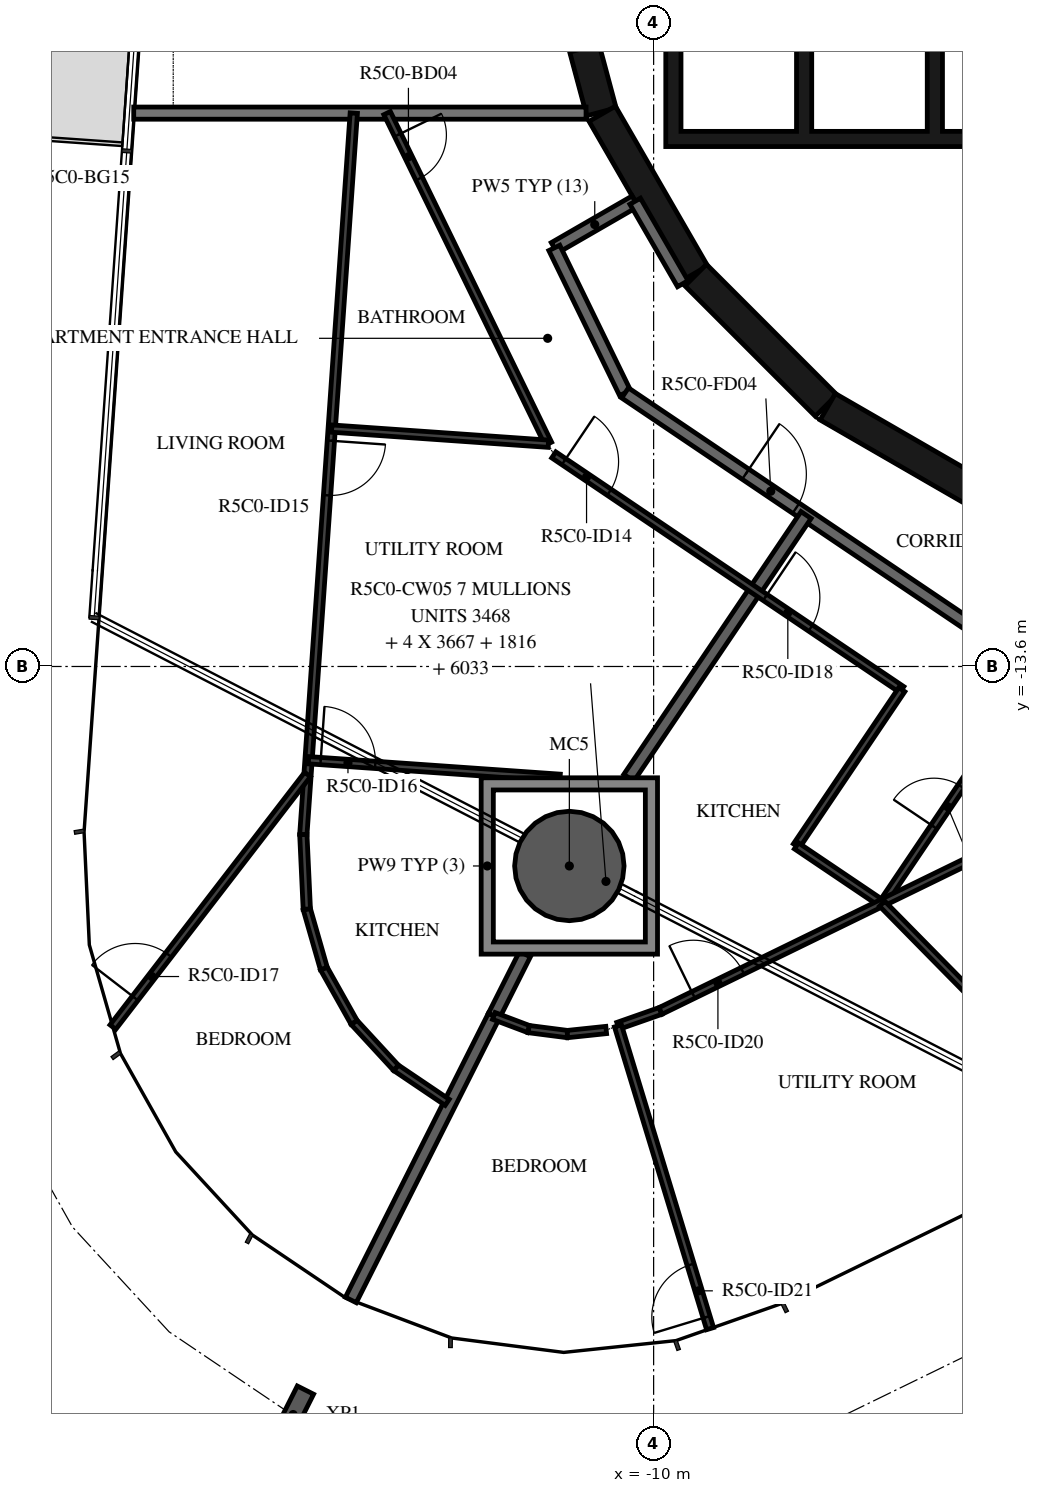
"""IFC4 building model, lengths in metres.
Left out: names, types, materials, properties, quantities, classifications, styles, units other than length and angle.
Written with IfcOpenShell. Run it as: python <this file> out.ifc"""

import sys

from ifc_helpers import new_model, si_unit, direction, frame, frame_2d, origin, origin_2d, place, context, subcontext, project, spatial, polyline, rectangle, hollow_circle, i_section, outline, extrude, element, fill, save


model = new_model("IFC4")
c1 = context("Model", 3, precision=1e-05, world=origin(), true_north=direction((0.0, 1.0)))
c2 = subcontext(c1, "Body", "Model", "MODEL_VIEW")
j1 = project(units=[si_unit("LENGTHUNIT", "METRE"), si_unit("PLANEANGLEUNIT", "RADIAN")], contexts=[c1])
p1 = place(None, origin())
s1 = spatial("IfcSite", under=j1, at=p1, CompositionType="ELEMENT")
p2 = place(p1, origin())
s2 = spatial("IfcBuilding", under=s1, at=p2, CompositionType="ELEMENT")
p3 = place(p2, frame((0.0, 0.0, 216.4)))
s3 = spatial("IfcBuildingStorey", under=s2, at=p3, CompositionType="ELEMENT", Elevation=216.4)
p4 = place(p3, frame((-11.386, -16.881, -0.38), z_axis=(0.0, 0.0, 1.0), x_axis=(1.0, 0.0, 0.0)))
e1 = element("IfcColumn", 1, at=p4, inside=s3, PredefinedType="COLUMN", context=c2, shape_type="SweptSolid", body=[
    extrude(hollow_circle(Radius=0.9, WallThickness=0.04, at=origin_2d()), origin(), (0.0, 0.0, 1.0), 2.616),
])
p5 = place(p3, frame((-15.928, -25.902, -0.38), z_axis=(0.0, 0.0, 1.0), x_axis=(-0.893169071277, 0.449721035881, 0.0)))
e2 = element("IfcColumn", 2, at=p5, inside=s3, PredefinedType="COLUMN", context=c2, shape_type="SweptSolid", body=[
    extrude(i_section(OverallWidth=0.3, OverallDepth=0.9, WebThickness=0.019, FlangeThickness=0.035, FilletRadius=0.03, at=origin_2d()), origin(), (0.0, 0.0, 1.0), 2.616),
])
p6 = place(p3, frame((-11.643, -1.55, 0.0), z_axis=(0.0, 0.0, 1.0), x_axis=(0.258734743916, -0.965948410781, 0.0)))
e3 = element("IfcWall", 3, at=p6, inside=s3, PredefinedType="SHEAR", context=c2, shape_type="SweptSolid", body=[
    extrude(rectangle(XDim=3.033, YDim=0.5, at=frame_2d((1.516, 0.0))), origin(), (0.0, 0.0, 1.0), 3.05),
])
p7 = place(p6, frame((1.066, 0.0, 0.0)))
e4 = element("IfcOpeningElement", 4, at=p7, cuts=e3, PredefinedType="OPENING", context=c2, shape_type="SweptSolid", body=[
    extrude(rectangle(XDim=0.9, YDim=2.1, at=frame_2d((0.45, 1.05))), frame((0.0, 0.26, 0.0), z_axis=(0.0, -1.0, 0.0), x_axis=(1.0, 0.0, 0.0)), (0.0, 0.0, 1.0), 0.52),
])
p8 = place(p3, frame((-10.845, -4.51, 0.0), z_axis=(0.0, 0.0, 1.0), x_axis=(0.500087131594, -0.865975092491, 0.0)))
e5 = element("IfcWall", 5, at=p8, inside=s3, PredefinedType="SHEAR", context=c2, shape_type="SweptSolid", body=[
    extrude(rectangle(XDim=3.033, YDim=0.5, at=frame_2d((1.516, 0.0))), origin(), (0.0, 0.0, 1.0), 3.05),
])
p9 = place(p3, frame((-9.308, -7.164, 0.0), z_axis=(0.0, 0.0, 1.0), x_axis=(0.707106781187, -0.707106781187, 0.0)))
e6 = element("IfcWall", 6, at=p9, inside=s3, PredefinedType="SHEAR", context=c2, shape_type="SweptSolid", body=[
    extrude(rectangle(XDim=3.032, YDim=0.5, at=frame_2d((1.516, 0.0))), origin(), (0.0, 0.0, 1.0), 3.05),
])
p10 = place(p3, frame((-7.137, -9.329, 0.0), z_axis=(0.0, 0.0, 1.0), x_axis=(0.865975092491, -0.500087131594, 0.0)))
e7 = element("IfcWall", 7, at=p10, inside=s3, PredefinedType="SHEAR", context=c2, shape_type="SweptSolid", body=[
    extrude(rectangle(XDim=3.033, YDim=0.5, at=frame_2d((1.516, 0.0))), origin(), (0.0, 0.0, 1.0), 3.05),
])
p11 = place(p3, origin())
e8 = element("IfcWall", 8, at=p11, inside=s3, PredefinedType="SHEAR", context=c2, shape_type="SweptSolid", body=[
    extrude(outline(polyline([(9.8, -5.05), (9.8, -4.8), (9.8, -1.9), (9.55, -1.9), (9.55, -4.8), (7.65, -4.8), (7.65, -1.9), (7.4, -1.9), (7.4, -4.8), (5.5, -4.8), (5.5, -1.9), (5.25, -1.9), (5.25, -4.8), (3.35, -4.8), (3.35, -1.9), (3.1, -1.9), (3.1, -4.8), (1.2, -4.8), (1.2, -1.9), (0.95, -1.9), (0.95, -4.8), (-5.25, -4.8), (-5.25, -1.9), (-5.5, -1.9), (-5.5, -4.8), (-7.4, -4.8), (-7.4, -1.9), (-7.65, -1.9), (-7.65, -4.8), (-9.55, -4.8), (-9.55, -1.9), (-9.8, -1.9), (-9.8, -4.8), (-9.8, -5.05), (9.8, -5.05)])), origin(), (0.0, 0.0, 1.0), 3.05),
])
p12 = place(p3, frame((-10.303, -5.949, 0.0), z_axis=(0.0, 0.0, 1.0), x_axis=(-0.866042588199, -0.499970234539, 0.0)))
e9 = element("IfcWall", 9, at=p12, inside=s3, PredefinedType="STANDARD", context=c2, shape_type="SweptSolid", body=[
    extrude(rectangle(XDim=1.535, YDim=0.2, at=frame_2d((0.768, 0.0))), origin(), (0.0, 0.0, 1.0), 3.05),
])
p13 = place(p3, frame((-11.633, -6.716, 0.0), z_axis=(0.0, 0.0, 1.0), x_axis=(0.438322116278, -0.898817958422, 0.0)))
e10 = element("IfcWall", 10, at=p13, inside=s3, PredefinedType="STANDARD", context=c2, shape_type="SweptSolid", body=[
    extrude(rectangle(XDim=2.654, YDim=0.2, at=frame_2d((1.327, 0.0))), origin(), (0.0, 0.0, 1.0), 3.05),
])
p14 = place(p3, frame((-10.47, -9.101, 0.0), z_axis=(0.0, 0.0, 1.0), x_axis=(0.829035841718, -0.559195469534, 0.0)))
e11 = element("IfcWall", 11, at=p14, inside=s3, PredefinedType="STANDARD", context=c2, shape_type="SweptSolid", body=[
    extrude(rectangle(XDim=7.181, YDim=0.2, at=frame_2d((3.591, 0.0))), origin(), (0.0, 0.0, 1.0), 3.05),
])
p15 = place(p14, frame((2.39, 0.0, 0.0)))
e12 = element("IfcOpeningElement", 12, at=p15, cuts=e11, PredefinedType="OPENING", context=c2, shape_type="SweptSolid", body=[
    extrude(rectangle(XDim=1.0, YDim=2.1, at=frame_2d((0.5, 1.05))), frame((0.0, 0.11, 0.0), z_axis=(0.0, -1.0, 0.0), x_axis=(1.0, 0.0, 0.0)), (0.0, 0.0, 1.0), 0.22),
])
p16 = place(p3, frame((-9.52, -7.305, 0.0), z_axis=(0.0, 0.0, 1.0), x_axis=(-0.500028278809, 0.866009076391, 0.0)))
e13 = element("IfcWall", 13, at=p16, inside=s3, PredefinedType="STANDARD", context=c2, shape_type="SweptSolid", body=[
    extrude(rectangle(XDim=1.566, YDim=0.2, at=frame_2d((0.783, 0.0))), origin(), (0.0, 0.0, 1.0), 3.05),
])
p17 = place(p3, frame((-18.55, -4.5, 0.0), z_axis=(0.0, 0.0, 1.0), x_axis=(1.0, 0.0, 0.0)))
e14 = element("IfcWall", 14, at=p17, inside=s3, PredefinedType="STANDARD", context=c2, shape_type="SweptSolid", body=[
    extrude(rectangle(XDim=7.438, YDim=0.2, at=frame_2d((3.719, 0.0))), origin(), (0.0, 0.0, 1.0), 3.05),
])
p18 = place(p3, frame((-10.408, -15.43, 0.0), z_axis=(0.0, 0.0, 1.0), x_axis=(0.559199317758, 0.829033246027, 0.0)))
e15 = element("IfcWall", 15, at=p18, inside=s3, PredefinedType="STANDARD", context=c2, shape_type="SweptSolid", body=[
    extrude(rectangle(XDim=5.212, YDim=0.2, at=frame_2d((2.606, 0.0))), origin(), (0.0, 0.0, 1.0), 3.05),
])
p19 = place(p3, frame((-14.979, -24.017, 0.0), z_axis=(0.0, 0.0, 1.0), x_axis=(0.449732900329, 0.89316309729, 0.0)))
e16 = element("IfcWall", 16, at=p19, inside=s3, PredefinedType="STANDARD", context=c2, shape_type="SweptSolid", body=[
    extrude(rectangle(XDim=5.229, YDim=0.2, at=frame_2d((2.615, 0.0))), origin(), (0.0, 0.0, 1.0), 3.05),
])
p20 = place(p3, frame((-12.628, -19.347, 0.0), z_axis=(0.0, 0.0, 1.0), x_axis=(0.449615653781, 0.8932221246, 0.0)))
e17 = element("IfcWall", 17, at=p20, inside=s3, PredefinedType="STANDARD", context=c2, shape_type="SweptSolid", body=[
    extrude(rectangle(XDim=1.138, YDim=0.2, at=frame_2d((0.569, 0.0))), origin(), (0.0, 0.0, 1.0), 3.05),
])
p21 = place(p3, frame((-14.383, -4.5, 0.0), z_axis=(0.0, 0.0, 1.0), x_axis=(0.438393414895, -0.898783185077, 0.0)))
e18 = element("IfcWall", 18, at=p21, inside=s3, PredefinedType="PARTITIONING", context=c2, shape_type="SweptSolid", body=[
    extrude(rectangle(XDim=6.049, YDim=0.12, at=frame_2d((3.024, 0.0))), origin(), (0.0, 0.0, 1.0), 3.05),
])
p22 = place(p21, frame((0.4, 0.0, 0.0)))
e19 = element("IfcOpeningElement", 19, at=p22, cuts=e18, PredefinedType="OPENING", context=c2, shape_type="SweptSolid", body=[
    extrude(rectangle(XDim=0.8, YDim=2.1, at=frame_2d((0.4, 1.05))), frame((0.0, 0.07, 0.0), z_axis=(0.0, -1.0, 0.0), x_axis=(1.0, 0.0, 0.0)), (0.0, 0.0, 1.0), 0.14),
])
p23 = place(p3, frame((-11.642, -10.12, 0.0), z_axis=(0.0, 0.0, 1.0), x_axis=(0.829029427133, -0.559204979365, 0.0)))
e20 = element("IfcWall", 20, at=p23, inside=s3, PredefinedType="PARTITIONING", context=c2, shape_type="SweptSolid", body=[
    extrude(rectangle(XDim=6.904, YDim=0.12, at=frame_2d((3.452, 0.0))), origin(), (0.0, 0.0, 1.0), 3.05),
])
p24 = place(p23, frame((0.2, 0.0, 0.0)))
e21 = element("IfcOpeningElement", 21, at=p24, cuts=e20, PredefinedType="OPENING", context=c2, shape_type="SweptSolid", body=[
    extrude(rectangle(XDim=0.9, YDim=2.1, at=frame_2d((0.45, 1.05))), frame((0.0, 0.07, 0.0), z_axis=(0.0, -1.0, 0.0), x_axis=(1.0, 0.0, 0.0)), (0.0, 0.0, 1.0), 0.14),
])
p25 = place(p23, frame((4.192, 0.0, 0.0)))
e22 = element("IfcOpeningElement", 22, at=p25, cuts=e20, PredefinedType="OPENING", context=c2, shape_type="SweptSolid", body=[
    extrude(rectangle(XDim=0.9, YDim=2.1, at=frame_2d((0.45, 1.05))), frame((0.0, 0.07, 0.0), z_axis=(0.0, -1.0, 0.0), x_axis=(1.0, 0.0, 0.0)), (0.0, 0.0, 1.0), 0.14),
])
p26 = place(p3, frame((-14.931, -4.5, 0.0), z_axis=(0.0, 0.0, 1.0), x_axis=(-0.069751708439, -0.997564383471, 0.0)))
e23 = element("IfcWall", 23, at=p26, inside=s3, PredefinedType="PARTITIONING", context=c2, shape_type="SweptSolid", body=[
    extrude(rectangle(XDim=11.894, YDim=0.12, at=frame_2d((5.947, 0.0))), origin(), (0.0, 0.0, 1.0), 3.05),
])
p27 = place(p26, frame((5.4, 0.0, 0.0)))
e24 = element("IfcOpeningElement", 24, at=p27, cuts=e23, PredefinedType="OPENING", context=c2, shape_type="SweptSolid", body=[
    extrude(rectangle(XDim=0.9, YDim=2.1, at=frame_2d((0.45, 1.05))), frame((0.0, 0.07, 0.0), z_axis=(0.0, -1.0, 0.0), x_axis=(1.0, 0.0, 0.0)), (0.0, 0.0, 1.0), 0.14),
])
p28 = place(p3, frame((-15.294, -9.688, 0.0), z_axis=(0.0, 0.0, 1.0), x_axis=(0.997565819809, -0.069731163391, 0.0)))
e25 = element("IfcWall", 25, at=p28, inside=s3, PredefinedType="PARTITIONING", context=c2, shape_type="SweptSolid", body=[
    extrude(rectangle(XDim=3.571, YDim=0.12, at=frame_2d((1.786, 0.0))), origin(), (0.0, 0.0, 1.0), 3.05),
])
p29 = place(p3, frame((-18.892, -19.531, 0.0), z_axis=(0.0, 0.0, 1.0), x_axis=(0.610347240441, 0.792133982408, 0.0)))
e26 = element("IfcWall", 26, at=p29, inside=s3, PredefinedType="PARTITIONING", context=c2, shape_type="SweptSolid", body=[
    extrude(rectangle(XDim=5.244, YDim=0.12, at=frame_2d((2.622, 0.0))), origin(), (0.0, 0.0, 1.0), 3.05),
])
p30 = place(p29, frame((0.6, 0.0, 0.0)))
e27 = element("IfcOpeningElement", 27, at=p30, cuts=e26, PredefinedType="OPENING", context=c2, shape_type="SweptSolid", body=[
    extrude(rectangle(XDim=0.9, YDim=2.1, at=frame_2d((0.45, 1.05))), frame((0.0, 0.07, 0.0), z_axis=(0.0, -1.0, 0.0), x_axis=(1.0, 0.0, 0.0)), (0.0, 0.0, 1.0), 0.14),
])
p31 = place(p3, frame((-15.675, -15.141, 0.0), z_axis=(0.0, 0.0, 1.0), x_axis=(0.997563107735, -0.06976995117, 0.0)))
e28 = element("IfcWall", 28, at=p31, inside=s3, PredefinedType="PARTITIONING", context=c2, shape_type="SweptSolid", body=[
    extrude(rectangle(XDim=4.146, YDim=0.12, at=frame_2d((2.073, 0.0))), origin(), (0.0, 0.0, 1.0), 3.05),
])
p32 = place(p31, frame((0.2, 0.0, 0.0)))
e29 = element("IfcOpeningElement", 29, at=p32, cuts=e28, PredefinedType="OPENING", context=c2, shape_type="SweptSolid", body=[
    extrude(rectangle(XDim=0.9, YDim=2.1, at=frame_2d((0.45, 1.05))), frame((0.0, 0.07, 0.0), z_axis=(0.0, -1.0, 0.0), x_axis=(1.0, 0.0, 0.0)), (0.0, 0.0, 1.0), 0.14),
])
for number, where, z_axis, x_axis in (
    (30, (-13.395, -20.767, 0.0), (0.0, 0.0, 1.0), (-0.829, 0.559, 0.0)),
    (31, (-14.237, -20.199, 0.0), (0.0, 0.0, 1.0), (-0.678, 0.735, 0.0)),
):
    element("IfcWall", number, at=place(p3, frame(where, z_axis=z_axis, x_axis=x_axis)), inside=s3, PredefinedType="PARTITIONING", context=c2, shape_type="SweptSolid", body=[
        extrude(rectangle(XDim=1.016, YDim=0.12, at=frame_2d((0.508, 0.0))), origin(), (0.0, 0.0, 1.0), 3.05),
    ])
p33 = place(p3, frame((-14.926, -19.452, 0.0), z_axis=(0.0, 0.0, 1.0), x_axis=(-0.489941776958, 0.871755157823, 0.0)))
e32 = element("IfcWall", 32, at=p33, inside=s3, PredefinedType="PARTITIONING", context=c2, shape_type="SweptSolid", body=[
    extrude(rectangle(XDim=1.016, YDim=0.12, at=frame_2d((0.508, 0.0))), origin(), (0.0, 0.0, 1.0), 3.05),
])
p34 = place(p3, frame((-15.424, -18.567, 0.0), z_axis=(0.0, 0.0, 1.0), x_axis=(-0.275641454312, 0.961260520704, 0.0)))
e33 = element("IfcWall", 33, at=p34, inside=s3, PredefinedType="PARTITIONING", context=c2, shape_type="SweptSolid", body=[
    extrude(rectangle(XDim=1.016, YDim=0.12, at=frame_2d((0.508, 0.0))), origin(), (0.0, 0.0, 1.0), 3.05),
])
p35 = place(p3, frame((-15.704, -17.59, 0.0), z_axis=(0.0, 0.0, 1.0), x_axis=(-0.046364428258, 0.998924591645, 0.0)))
e34 = element("IfcWall", 34, at=p35, inside=s3, PredefinedType="PARTITIONING", context=c2, shape_type="SweptSolid", body=[
    extrude(rectangle(XDim=1.227, YDim=0.12, at=frame_2d((0.613, 0.0))), origin(), (0.0, 0.0, 1.0), 3.05),
])
p36 = place(p3, frame((-5.918, -13.981, 0.0), z_axis=(0.0, 0.0, 1.0), x_axis=(-0.559254999968, -0.828995684555, 0.0)))
e35 = element("IfcWall", 35, at=p36, inside=s3, PredefinedType="PARTITIONING", context=c2, shape_type="SweptSolid", body=[
    extrude(rectangle(XDim=3.099, YDim=0.12, at=frame_2d((1.55, 0.0))), origin(), (0.0, 0.0, 1.0), 3.05),
])
p37 = place(p3, frame((-7.652, -16.55, 0.0), z_axis=(0.0, 0.0, 1.0), x_axis=(0.829053397483, -0.559169441334, 0.0)))
e36 = element("IfcWall", 36, at=p37, inside=s3, PredefinedType="PARTITIONING", context=c2, shape_type="SweptSolid", body=[
    extrude(rectangle(XDim=1.686, YDim=0.12, at=frame_2d((0.843, 0.0))), origin(), (0.0, 0.0, 1.0), 3.05),
])
p38 = place(p3, frame((-6.229, -17.48, 0.0), z_axis=(0.0, 0.0, 1.0), x_axis=(0.559206483048, 0.829028412853, 0.0)))
e37 = element("IfcWall", 37, at=p38, inside=s3, PredefinedType="PARTITIONING", context=c2, shape_type="SweptSolid", body=[
    extrude(rectangle(XDim=3.432, YDim=0.12, at=frame_2d((1.716, 0.0))), origin(), (0.0, 0.0, 1.0), 3.05),
])
p39 = place(p38, frame((1.5, 0.0, 0.0)))
e38 = element("IfcOpeningElement", 38, at=p39, cuts=e37, PredefinedType="OPENING", context=c2, shape_type="SweptSolid", body=[
    extrude(rectangle(XDim=0.8, YDim=2.1, at=frame_2d((0.4, 1.05))), frame((0.0, 0.07, 0.0), z_axis=(0.0, -1.0, 0.0), x_axis=(1.0, 0.0, 0.0)), (0.0, 0.0, 1.0), 0.14),
])
p40 = place(p3, frame((-12.628, -19.347, 0.0), z_axis=(0.0, 0.0, 1.0), x_axis=(0.935507243946, -0.353307509862, 0.0)))
e39 = element("IfcWall", 39, at=p40, inside=s3, PredefinedType="PARTITIONING", context=c2, shape_type="SweptSolid", body=[
    extrude(rectangle(XDim=0.612, YDim=0.12, at=frame_2d((0.306, 0.0))), origin(), (0.0, 0.0, 1.0), 3.05),
])
p41 = place(p3, frame((-12.055, -19.563, 0.0), z_axis=(0.0, 0.0, 1.0), x_axis=(0.991802759529, -0.127778269633, 0.0)))
e40 = element("IfcWall", 40, at=p41, inside=s3, PredefinedType="PARTITIONING", context=c2, shape_type="SweptSolid", body=[
    extrude(rectangle(XDim=0.642, YDim=0.12, at=frame_2d((0.321, 0.0))), origin(), (0.0, 0.0, 1.0), 3.05),
])
p42 = place(p3, frame((-11.418, -19.645, 0.0), z_axis=(0.0, 0.0, 1.0), x_axis=(0.994515867502, 0.104585798686, 0.0)))
e41 = element("IfcWall", 41, at=p42, inside=s3, PredefinedType="PARTITIONING", context=c2, shape_type="SweptSolid", body=[
    extrude(rectangle(XDim=0.642, YDim=0.12, at=frame_2d((0.321, 0.0))), origin(), (0.0, 0.0, 1.0), 3.05),
])
p43 = place(p3, frame((-10.586, -19.51, 0.0), z_axis=(0.0, 0.0, 1.0), x_axis=(0.943560277016, 0.3312008509, 0.0)))
e42 = element("IfcWall", 42, at=p43, inside=s3, PredefinedType="PARTITIONING", context=c2, shape_type="SweptSolid", body=[
    extrude(rectangle(XDim=0.741, YDim=0.12, at=frame_2d((0.371, 0.0))), origin(), (0.0, 0.0, 1.0), 3.05),
])
p44 = place(p3, frame((-9.886, -19.264, 0.0), z_axis=(0.0, 0.0, 1.0), x_axis=(0.898796326112, 0.43836647245, 0.0)))
e43 = element("IfcWall", 43, at=p44, inside=s3, PredefinedType="PARTITIONING", context=c2, shape_type="SweptSolid", body=[
    extrude(rectangle(XDim=10.014, YDim=0.12, at=frame_2d((5.007, 0.0))), origin(), (0.0, 0.0, 1.0), 3.05),
])
p45 = place(p44, frame((0.6, 0.0, 0.0)))
e44 = element("IfcOpeningElement", 44, at=p45, cuts=e43, PredefinedType="OPENING", context=c2, shape_type="SweptSolid", body=[
    extrude(rectangle(XDim=0.9, YDim=2.1, at=frame_2d((0.45, 1.05))), frame((0.0, 0.07, 0.0), z_axis=(0.0, -1.0, 0.0), x_axis=(1.0, 0.0, 0.0)), (0.0, 0.0, 1.0), 0.14),
])
p46 = place(p3, frame((-9.072, -24.489, 0.0), z_axis=(0.0, 0.0, 1.0), x_axis=(-0.291025348593, 0.956715342449, 0.0)))
e45 = element("IfcWall", 45, at=p46, inside=s3, PredefinedType="PARTITIONING", context=c2, shape_type="SweptSolid", body=[
    extrude(rectangle(XDim=5.205, YDim=0.12, at=frame_2d((2.602, 0.0))), origin(), (0.0, 0.0, 1.0), 3.05),
])
p47 = place(p46, frame((0.2, 0.0, 0.0)))
e46 = element("IfcOpeningElement", 46, at=p47, cuts=e45, PredefinedType="OPENING", context=c2, shape_type="SweptSolid", body=[
    extrude(rectangle(XDim=0.9, YDim=2.1, at=frame_2d((0.45, 1.05))), frame((0.0, 0.07, 0.0), z_axis=(0.0, -1.0, 0.0), x_axis=(1.0, 0.0, 0.0)), (0.0, 0.0, 1.0), 0.14),
])
p48 = place(p3, frame((-2.403, -21.4, 0.0), z_axis=(0.0, 0.0, 1.0), x_axis=(-0.70162063199, 0.712550692067, 0.0)))
e47 = element("IfcWall", 47, at=p48, inside=s3, PredefinedType="PARTITIONING", context=c2, shape_type="SweptSolid", body=[
    extrude(rectangle(XDim=5.472, YDim=0.12, at=frame_2d((2.736, 0.0))), origin(), (0.0, 0.0, 1.0), 3.05),
])
p49 = place(p3, origin())
e48 = element("IfcWall", 48, at=p49, inside=s3, PredefinedType="STANDARD", context=c2, shape_type="SweptSolid", body=[
    extrude(outline(polyline([(-9.936, -15.43), (-9.936, -18.331), (-12.836, -18.331), (-12.836, -15.43), (-9.936, -15.43)]), holes=[polyline([(-12.636, -18.131), (-10.136, -18.131), (-10.136, -15.631), (-12.636, -15.631), (-12.636, -18.131)])]), origin(), (0.0, 0.0, 1.0), 3.05),
])
p50 = place(p15, origin())
e49 = element("IfcDoor", 49, at=p50, inside=s3, OperationType="SINGLE_SWING_RIGHT", PredefinedType="DOOR", context=c2, shape_type="SweptSolid", body=[
    extrude(rectangle(XDim=1.0, YDim=2.1, at=frame_2d((0.5, 1.05))), frame((0.0, 0.025, 0.0), z_axis=(0.0, -1.0, 0.0), x_axis=(1.0, 0.0, 0.0)), (0.0, 0.0, 1.0), 0.05),
])
fill(e12, e49)
p51 = place(p22, origin())
e50 = element("IfcDoor", 50, at=p51, inside=s3, OperationType="SINGLE_SWING_RIGHT", PredefinedType="DOOR", context=c2, shape_type="SweptSolid", body=[
    extrude(rectangle(XDim=0.8, YDim=2.1, at=frame_2d((0.4, 1.05))), frame((0.0, 0.025, 0.0), z_axis=(0.0, -1.0, 0.0), x_axis=(1.0, 0.0, 0.0)), (0.0, 0.0, 1.0), 0.05),
])
fill(e19, e50)
p52 = place(p24, origin())
e51 = element("IfcDoor", 51, at=p52, inside=s3, OperationType="SINGLE_SWING_RIGHT", PredefinedType="DOOR", context=c2, shape_type="SweptSolid", body=[
    extrude(rectangle(XDim=0.9, YDim=2.1, at=frame_2d((0.45, 1.05))), frame((0.0, 0.025, 0.0), z_axis=(0.0, -1.0, 0.0), x_axis=(1.0, 0.0, 0.0)), (0.0, 0.0, 1.0), 0.05),
])
fill(e21, e51)
p53 = place(p27, origin())
e52 = element("IfcDoor", 52, at=p53, inside=s3, OperationType="SINGLE_SWING_RIGHT", PredefinedType="DOOR", context=c2, shape_type="SweptSolid", body=[
    extrude(rectangle(XDim=0.9, YDim=2.1, at=frame_2d((0.45, 1.05))), frame((0.0, 0.025, 0.0), z_axis=(0.0, -1.0, 0.0), x_axis=(1.0, 0.0, 0.0)), (0.0, 0.0, 1.0), 0.05),
])
fill(e24, e52)
p54 = place(p32, origin())
e53 = element("IfcDoor", 53, at=p54, inside=s3, OperationType="SINGLE_SWING_RIGHT", PredefinedType="DOOR", context=c2, shape_type="SweptSolid", body=[
    extrude(rectangle(XDim=0.9, YDim=2.1, at=frame_2d((0.45, 1.05))), frame((0.0, 0.025, 0.0), z_axis=(0.0, -1.0, 0.0), x_axis=(1.0, 0.0, 0.0)), (0.0, 0.0, 1.0), 0.05),
])
fill(e29, e53)
p55 = place(p30, origin())
e54 = element("IfcDoor", 54, at=p55, inside=s3, OperationType="SINGLE_SWING_RIGHT", PredefinedType="DOOR", context=c2, shape_type="SweptSolid", body=[
    extrude(rectangle(XDim=0.9, YDim=2.1, at=frame_2d((0.45, 1.05))), frame((0.0, 0.025, 0.0), z_axis=(0.0, -1.0, 0.0), x_axis=(1.0, 0.0, 0.0)), (0.0, 0.0, 1.0), 0.05),
])
fill(e27, e54)
p56 = place(p25, origin())
e55 = element("IfcDoor", 55, at=p56, inside=s3, OperationType="SINGLE_SWING_LEFT", PredefinedType="DOOR", context=c2, shape_type="SweptSolid", body=[
    extrude(rectangle(XDim=0.9, YDim=2.1, at=frame_2d((0.45, 1.05))), frame((0.0, 0.025, 0.0), z_axis=(0.0, -1.0, 0.0), x_axis=(1.0, 0.0, 0.0)), (0.0, 0.0, 1.0), 0.05),
])
fill(e22, e55)
p57 = place(p39, origin())
e56 = element("IfcDoor", 56, at=p57, inside=s3, OperationType="SINGLE_SWING_LEFT", PredefinedType="DOOR", context=c2, shape_type="SweptSolid", body=[
    extrude(rectangle(XDim=0.8, YDim=2.1, at=frame_2d((0.4, 1.05))), frame((0.0, 0.025, 0.0), z_axis=(0.0, -1.0, 0.0), x_axis=(1.0, 0.0, 0.0)), (0.0, 0.0, 1.0), 0.05),
])
fill(e38, e56)
p58 = place(p45, origin())
e57 = element("IfcDoor", 57, at=p58, inside=s3, OperationType="SINGLE_SWING_LEFT", PredefinedType="DOOR", context=c2, shape_type="SweptSolid", body=[
    extrude(rectangle(XDim=0.9, YDim=2.1, at=frame_2d((0.45, 1.05))), frame((0.0, 0.025, 0.0), z_axis=(0.0, -1.0, 0.0), x_axis=(1.0, 0.0, 0.0)), (0.0, 0.0, 1.0), 0.05),
])
fill(e44, e57)
p59 = place(p47, origin())
e58 = element("IfcDoor", 58, at=p59, inside=s3, OperationType="SINGLE_SWING_LEFT", PredefinedType="DOOR", context=c2, shape_type="SweptSolid", body=[
    extrude(rectangle(XDim=0.9, YDim=2.1, at=frame_2d((0.45, 1.05))), frame((0.0, 0.025, 0.0), z_axis=(0.0, -1.0, 0.0), x_axis=(1.0, 0.0, 0.0)), (0.0, 0.0, 1.0), 0.05),
])
fill(e46, e58)
save(model, sys.argv[1])
